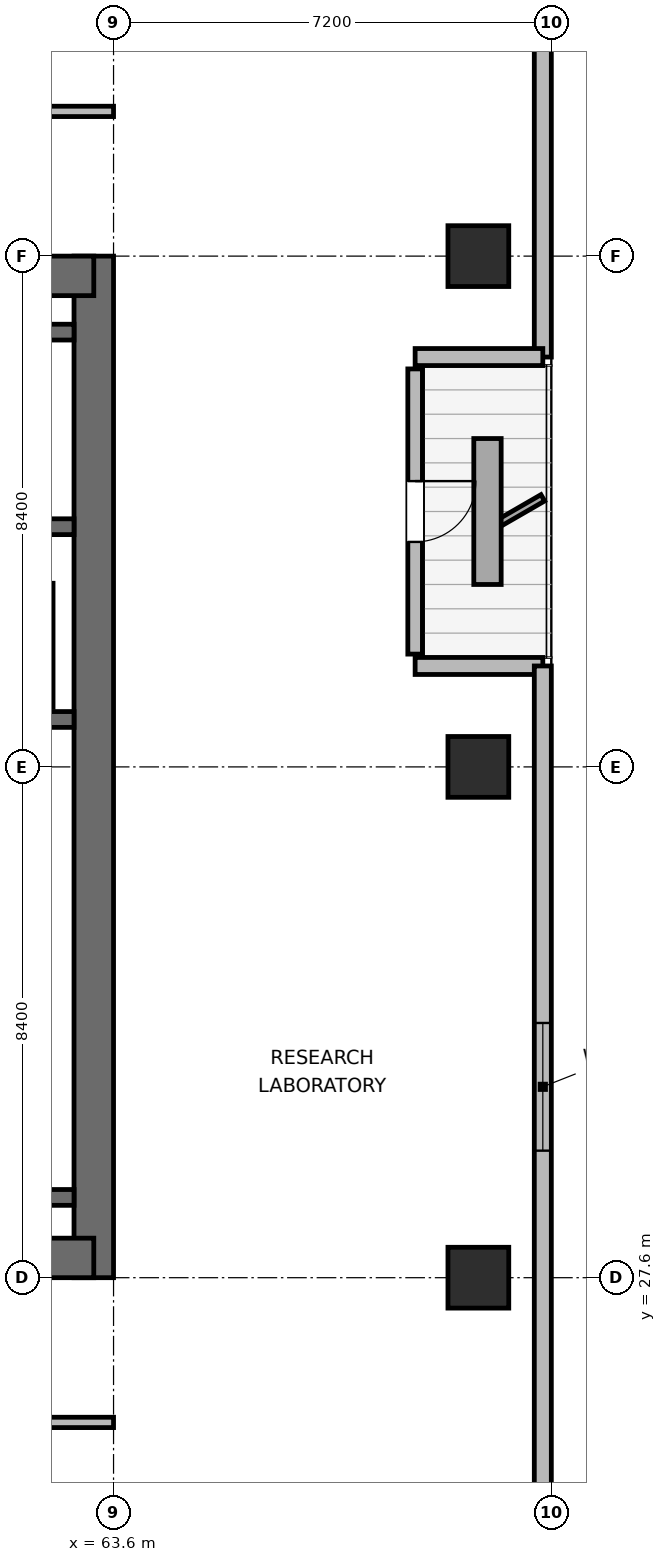
"""IFC4 building model, lengths in metres.
Left out: names, types, materials, properties, quantities, classifications, styles, units other than length and angle.
Written with IfcOpenShell. Run it as: python <this file> out.ifc"""

import sys

from ifc_helpers import new_model, si_unit, direction, frame, frame_2d, origin, origin_2d, place, context, subcontext, project, spatial, rectangle, extrude, element, fill, save


model = new_model("IFC4")
c1 = context("Model", 3, precision=1e-05, world=origin(), true_north=direction((0.0, 1.0)))
c2 = subcontext(c1, "Body", "Model", "MODEL_VIEW")
j1 = project(units=[si_unit("LENGTHUNIT", "METRE"), si_unit("PLANEANGLEUNIT", "RADIAN")], contexts=[c1])
p1 = place(None, origin())
s1 = spatial("IfcSite", under=j1, at=p1, CompositionType="ELEMENT")
p2 = place(p1, origin())
s2 = spatial("IfcBuilding", under=s1, at=p2, CompositionType="ELEMENT")
p3 = place(p2, frame((0.0, 0.0, 251.1)))
s3 = spatial("IfcBuildingStorey", under=s2, at=p3, CompositionType="ELEMENT", Elevation=251.1)
p4 = place(p3, frame((63.275, 27.6, 0.0), z_axis=(0.0, 0.0, 1.0), x_axis=(0.0, 1.0, 0.0)))
e1 = element("IfcWall", 1, at=p4, inside=s3, PredefinedType="SHEAR", context=c2, shape_type="SweptSolid", body=[
    extrude(rectangle(XDim=16.8, YDim=0.65, at=frame_2d((8.4, 0.0))), origin(), (0.0, 0.0, 1.0), 3.9),
])
p5 = place(p3, frame((53.925, 27.925, 0.0), z_axis=(0.0, 0.0, 1.0), x_axis=(1.0, 0.0, 0.0)))
e2 = element("IfcWall", 2, at=p5, inside=s3, PredefinedType="SHEAR", context=c2, shape_type="SweptSolid", body=[
    extrude(rectangle(XDim=9.35, YDim=0.65, at=frame_2d((4.675, 0.0))), origin(), (0.0, 0.0, 1.0), 3.9),
])
p6 = place(p5, frame((3.975, 0.0, 0.0)))
e3 = element("IfcOpeningElement", 3, at=p6, cuts=e2, PredefinedType="OPENING", context=c2, shape_type="SweptSolid", body=[
    extrude(rectangle(XDim=1.05, YDim=2.04, at=frame_2d((0.525, 1.02))), frame((0.0, 0.335, 0.0), z_axis=(0.0, -1.0, 0.0), x_axis=(1.0, 0.0, 0.0)), (0.0, 0.0, 1.0), 0.67),
])
p7 = place(p3, frame((53.925, 44.075, 0.0), z_axis=(0.0, 0.0, 1.0), x_axis=(1.0, 0.0, 0.0)))
e4 = element("IfcWall", 4, at=p7, inside=s3, PredefinedType="SHEAR", context=c2, shape_type="SweptSolid", body=[
    extrude(rectangle(XDim=9.35, YDim=0.65, at=frame_2d((4.675, 0.0))), origin(), (0.0, 0.0, 1.0), 3.9),
])
for number, where, z_axis, x_axis in (
    (5, (58.89, 28.92, 0.0), (0.0, 0.0, 1.0), (1.0, 0.0, 0.0)),
    (6, (58.89, 36.78, 0.0), (0.0, 0.0, 1.0), (1.0, 0.0, 0.0)),
):
    element("IfcWall", number, at=place(p3, frame(where, z_axis=z_axis, x_axis=x_axis)), inside=s3, PredefinedType="SHEAR", context=c2, shape_type="SweptSolid", body=[
        extrude(rectangle(XDim=4.06, YDim=0.26, at=frame_2d((2.03, 0.0))), origin(), (0.0, 0.0, 1.0), 3.9),
    ])
p8 = place(p3, frame((54.25, 39.95, 0.0), z_axis=(0.0, 0.0, 1.0), x_axis=(1.0, 0.0, 0.0)))
e7 = element("IfcWall", 7, at=p8, inside=s3, PredefinedType="SHEAR", context=c2, shape_type="SweptSolid", body=[
    extrude(rectangle(XDim=8.7, YDim=0.26, at=frame_2d((4.35, 0.0))), origin(), (0.0, 0.0, 1.0), 3.9),
])
p9 = place(p8, frame((0.95, 0.0, 0.0)))
e8 = element("IfcOpeningElement", 8, at=p9, cuts=e7, PredefinedType="OPENING", context=c2, shape_type="SweptSolid", body=[
    extrude(rectangle(XDim=1.0, YDim=2.04, at=frame_2d((0.5, 1.02))), frame((0.0, 0.14, 0.0), z_axis=(0.0, -1.0, 0.0), x_axis=(1.0, 0.0, 0.0)), (0.0, 0.0, 1.0), 0.28),
])
p10 = place(p3, frame((54.25, 43.15, 0.0), z_axis=(0.0, 0.0, 1.0), x_axis=(1.0, 0.0, 0.0)))
e9 = element("IfcWall", 9, at=p10, inside=s3, PredefinedType="SHEAR", context=c2, shape_type="SweptSolid", body=[
    extrude(rectangle(XDim=8.7, YDim=0.26, at=frame_2d((4.35, 0.0))), origin(), (0.0, 0.0, 1.0), 3.9),
])
for number, where, z_axis, x_axis in (
    (10, (69.6, 27.6, 0.0), (0.0, 0.0, 1.0), (1.0, 0.0, 0.0)),
    (11, (69.6, 36.0, 0.0), (0.0, 0.0, 1.0), (1.0, 0.0, 0.0)),
    (12, (69.6, 44.4, 0.0), (0.0, 0.0, 1.0), (1.0, 0.0, 0.0)),
):
    element("IfcColumn", number, at=place(p3, frame(where, z_axis=z_axis, x_axis=x_axis)), inside=s3, PredefinedType="COLUMN", context=c2, shape_type="SweptSolid", body=[
        extrude(rectangle(XDim=1.0, YDim=1.0, at=origin_2d()), origin(), (0.0, 0.0, 1.0), 3.9),
    ])
p11 = place(p3, frame((70.66, 57.182, 0.0), z_axis=(0.0, 0.0, 1.0), x_axis=(0.0, -1.0, 0.0)))
e13 = element("IfcWall", 13, at=p11, inside=s3, PredefinedType="SOLIDWALL", context=c2, shape_type="SweptSolid", body=[
    extrude(rectangle(XDim=14.442, YDim=0.28, at=frame_2d((7.221, 0.0))), origin(), (0.0, 0.0, 1.0), 3.68),
])
p12 = place(p3, frame((70.66, 42.74, 0.0), z_axis=(0.0, 0.0, 1.0), x_axis=(-1.0, 0.0, 0.0)))
e14 = element("IfcWall", 14, at=p12, inside=s3, PredefinedType="SOLIDWALL", context=c2, shape_type="SweptSolid", body=[
    extrude(rectangle(XDim=2.1, YDim=0.28, at=frame_2d((1.05, 0.0))), origin(), (0.0, 0.0, 1.0), 2.215),
])
p13 = place(p3, frame((68.56, 42.545, 0.0), z_axis=(0.0, 0.0, 1.0), x_axis=(0.0, -1.0, 0.0)))
e15 = element("IfcWall", 15, at=p13, inside=s3, PredefinedType="SOLIDWALL", context=c2, shape_type="SweptSolid", body=[
    extrude(rectangle(XDim=4.69, YDim=0.24, at=frame_2d((2.345, 0.0))), origin(), (0.0, 0.0, 1.0), 3.248),
])
p14 = place(p13, frame((1.845, 0.0, 0.0)))
e16 = element("IfcOpeningElement", 16, at=p14, cuts=e15, PredefinedType="OPENING", context=c2, shape_type="SweptSolid", body=[
    extrude(rectangle(XDim=1.0, YDim=2.02, at=frame_2d((0.5, 1.01))), frame((0.0, 0.13, 0.0), z_axis=(0.0, -1.0, 0.0), x_axis=(1.0, 0.0, 0.0)), (0.0, 0.0, 1.0), 0.26),
])
p15 = place(p3, frame((68.56, 37.66, 0.0), z_axis=(0.0, 0.0, 1.0), x_axis=(1.0, 0.0, 0.0)))
e17 = element("IfcWall", 17, at=p15, inside=s3, PredefinedType="SOLIDWALL", context=c2, shape_type="SweptSolid", body=[
    extrude(rectangle(XDim=2.1, YDim=0.28, at=frame_2d((1.05, 0.0))), origin(), (0.0, 0.0, 1.0), 2.215),
])
p16 = place(p3, frame((70.66, 37.66, 0.0), z_axis=(0.0, 0.0, 1.0), x_axis=(0.0, -1.0, 0.0)))
e18 = element("IfcWall", 18, at=p16, inside=s3, PredefinedType="SOLIDWALL", context=c2, shape_type="SweptSolid", body=[
    extrude(rectangle(XDim=13.842, YDim=0.28, at=frame_2d((6.921, 0.0))), origin(), (0.0, 0.0, 1.0), 3.68),
])
p17 = place(p16, frame((5.871, 0.0, 0.85)))
e19 = element("IfcOpeningElement", 19, at=p17, cuts=e18, PredefinedType="OPENING", context=c2, shape_type="SweptSolid", body=[
    extrude(rectangle(XDim=2.1, YDim=1.05, at=frame_2d((1.05, 0.525))), frame((0.0, 0.15, 0.0), z_axis=(0.0, -1.0, 0.0), x_axis=(1.0, 0.0, 0.0)), (0.0, 0.0, 1.0), 0.3),
])
p18 = place(p3, frame((62.5, 36.98, 0.0), z_axis=(0.0, 0.0, 1.0), x_axis=(0.0, 1.0, 0.0)))
e20 = element("IfcWall", 20, at=p18, inside=s3, PredefinedType="PARTITIONING", context=c2, shape_type="SweptSolid", body=[
    extrude(rectangle(XDim=2.04, YDim=0.21, at=frame_2d((1.02, 0.0))), origin(), (0.0, 0.0, 1.0), 3.68),
])
p19 = place(p3, frame((30.075, 25.22, 0.0), z_axis=(0.0, 0.0, 1.0), x_axis=(1.0, 0.0, 0.0)))
e21 = element("IfcWall", 21, at=p19, inside=s3, PredefinedType="PARTITIONING", context=c2, shape_type="SweptSolid", body=[
    extrude(rectangle(XDim=33.525, YDim=0.17, at=frame_2d((16.763, 0.0))), origin(), (0.0, 0.0, 1.0), 3.68),
])
p20 = place(p19, frame((2.717, 0.0, 0.0)))
e22 = element("IfcOpeningElement", 22, at=p20, cuts=e21, PredefinedType="OPENING", context=c2, shape_type="SweptSolid", body=[
    extrude(rectangle(XDim=0.95, YDim=2.04, at=frame_2d((0.475, 1.02))), frame((0.0, 0.095, 0.0), z_axis=(0.0, -1.0, 0.0), x_axis=(1.0, 0.0, 0.0)), (0.0, 0.0, 1.0), 0.19),
])
p21 = place(p19, frame((8.505, 0.0, 0.0)))
e23 = element("IfcOpeningElement", 23, at=p21, cuts=e21, PredefinedType="OPENING", context=c2, shape_type="SweptSolid", body=[
    extrude(rectangle(XDim=0.95, YDim=2.04, at=frame_2d((0.475, 1.02))), frame((0.0, 0.095, 0.0), z_axis=(0.0, -1.0, 0.0), x_axis=(1.0, 0.0, 0.0)), (0.0, 0.0, 1.0), 0.19),
])
p22 = place(p19, frame((13.695, 0.0, 0.0)))
e24 = element("IfcOpeningElement", 24, at=p22, cuts=e21, PredefinedType="OPENING", context=c2, shape_type="SweptSolid", body=[
    extrude(rectangle(XDim=0.95, YDim=2.04, at=frame_2d((0.475, 1.02))), frame((0.0, 0.095, 0.0), z_axis=(0.0, -1.0, 0.0), x_axis=(1.0, 0.0, 0.0)), (0.0, 0.0, 1.0), 0.19),
])
p23 = place(p19, frame((18.88, 0.0, 0.0)))
e25 = element("IfcOpeningElement", 25, at=p23, cuts=e21, PredefinedType="OPENING", context=c2, shape_type="SweptSolid", body=[
    extrude(rectangle(XDim=0.95, YDim=2.04, at=frame_2d((0.475, 1.02))), frame((0.0, 0.095, 0.0), z_axis=(0.0, -1.0, 0.0), x_axis=(1.0, 0.0, 0.0)), (0.0, 0.0, 1.0), 0.19),
])
p24 = place(p19, frame((24.065, 0.0, 0.0)))
e26 = element("IfcOpeningElement", 26, at=p24, cuts=e21, PredefinedType="OPENING", context=c2, shape_type="SweptSolid", body=[
    extrude(rectangle(XDim=0.95, YDim=2.04, at=frame_2d((0.475, 1.02))), frame((0.0, 0.095, 0.0), z_axis=(0.0, -1.0, 0.0), x_axis=(1.0, 0.0, 0.0)), (0.0, 0.0, 1.0), 0.19),
])
p25 = place(p19, frame((29.855, 0.0, 0.0)))
e27 = element("IfcOpeningElement", 27, at=p25, cuts=e21, PredefinedType="OPENING", context=c2, shape_type="SweptSolid", body=[
    extrude(rectangle(XDim=0.95, YDim=2.04, at=frame_2d((0.475, 1.02))), frame((0.0, 0.095, 0.0), z_axis=(0.0, -1.0, 0.0), x_axis=(1.0, 0.0, 0.0)), (0.0, 0.0, 1.0), 0.19),
])
p26 = place(p3, frame((30.075, 46.78, 0.0), z_axis=(0.0, 0.0, 1.0), x_axis=(1.0, 0.0, 0.0)))
e28 = element("IfcWall", 28, at=p26, inside=s3, PredefinedType="PARTITIONING", context=c2, shape_type="SweptSolid", body=[
    extrude(rectangle(XDim=33.525, YDim=0.17, at=frame_2d((16.763, 0.0))), origin(), (0.0, 0.0, 1.0), 3.68),
])
p27 = place(p26, frame((4.693, 0.0, 0.0)))
e29 = element("IfcOpeningElement", 29, at=p27, cuts=e28, PredefinedType="OPENING", context=c2, shape_type="SweptSolid", body=[
    extrude(rectangle(XDim=0.95, YDim=2.04, at=frame_2d((0.475, 1.02))), frame((0.0, 0.095, 0.0), z_axis=(0.0, -1.0, 0.0), x_axis=(1.0, 0.0, 0.0)), (0.0, 0.0, 1.0), 0.19),
])
p28 = place(p26, frame((11.725, 0.0, 0.0)))
e30 = element("IfcOpeningElement", 30, at=p28, cuts=e28, PredefinedType="OPENING", context=c2, shape_type="SweptSolid", body=[
    extrude(rectangle(XDim=0.95, YDim=2.04, at=frame_2d((0.475, 1.02))), frame((0.0, 0.095, 0.0), z_axis=(0.0, -1.0, 0.0), x_axis=(1.0, 0.0, 0.0)), (0.0, 0.0, 1.0), 0.19),
])
p29 = place(p26, frame((19.505, 0.0, 0.0)))
e31 = element("IfcOpeningElement", 31, at=p29, cuts=e28, PredefinedType="OPENING", context=c2, shape_type="SweptSolid", body=[
    extrude(rectangle(XDim=0.95, YDim=2.04, at=frame_2d((0.475, 1.02))), frame((0.0, 0.095, 0.0), z_axis=(0.0, -1.0, 0.0), x_axis=(1.0, 0.0, 0.0)), (0.0, 0.0, 1.0), 0.19),
])
p30 = place(p26, frame((29.235, 0.0, 0.0)))
e32 = element("IfcOpeningElement", 32, at=p30, cuts=e28, PredefinedType="OPENING", context=c2, shape_type="SweptSolid", body=[
    extrude(rectangle(XDim=0.95, YDim=2.04, at=frame_2d((0.475, 1.02))), frame((0.0, 0.095, 0.0), z_axis=(0.0, -1.0, 0.0), x_axis=(1.0, 0.0, 0.0)), (0.0, 0.0, 1.0), 0.19),
])
p31 = place(p14, origin())
e33 = element("IfcDoor", 33, at=p31, inside=s3, OperationType="SINGLE_SWING_LEFT", PredefinedType="DOOR", context=c2, shape_type="SweptSolid", body=[
    extrude(rectangle(XDim=1.0, YDim=2.02, at=frame_2d((0.5, 1.01))), frame((0.0, 0.025, 0.0), z_axis=(0.0, -1.0, 0.0), x_axis=(1.0, 0.0, 0.0)), (0.0, 0.0, 1.0), 0.05),
])
fill(e16, e33)
p32 = place(p17, origin())
e34 = element("IfcWindow", 34, at=p32, inside=s3, PartitioningType="SINGLE_PANEL", PredefinedType="WINDOW", context=c2, shape_type="SweptSolid", body=[
    extrude(rectangle(XDim=2.1, YDim=1.05, at=frame_2d((1.05, 0.525))), frame((0.0, 0.03, 0.0), z_axis=(0.0, -1.0, 0.0), x_axis=(1.0, 0.0, 0.0)), (0.0, 0.0, 1.0), 0.06),
])
fill(e19, e34)
save(model, sys.argv[1])
